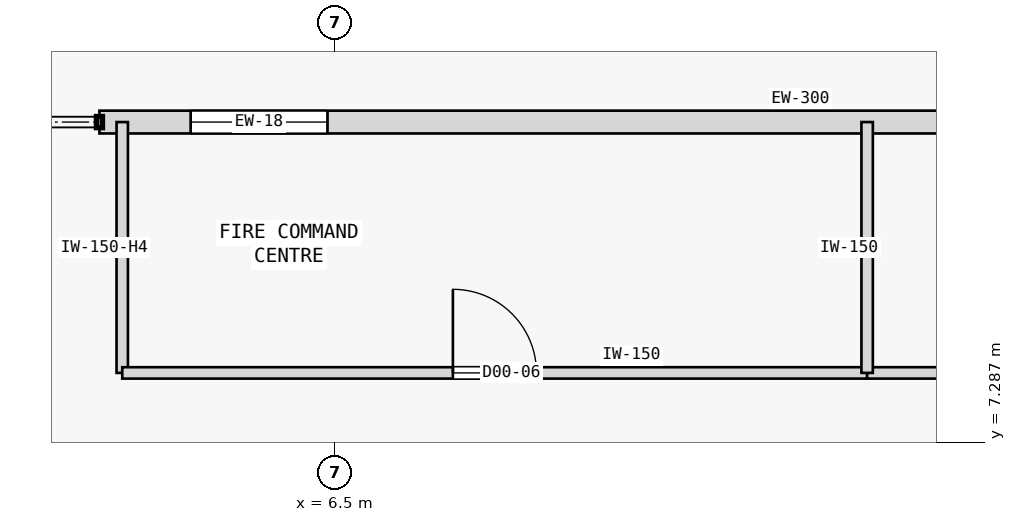
"""IFC4 building model, lengths in metres.
Left out: names, types, materials, properties, quantities, classifications, styles, units other than length and angle.
Written with IfcOpenShell. Run it as: python <this file> out.ifc"""

import sys

from ifc_helpers import new_model, si_unit, direction, frame, frame_2d, origin, place, context, subcontext, project, spatial, rectangle, extrude, element, fill, save


model = new_model("IFC4")
c1 = context("Model", 3, precision=1e-05, world=origin(), true_north=direction((0.0, 1.0)))
c2 = subcontext(c1, "Body", "Model", "MODEL_VIEW")
j1 = project(units=[si_unit("LENGTHUNIT", "METRE"), si_unit("PLANEANGLEUNIT", "RADIAN")], contexts=[c1])
p1 = place(None, origin())
s1 = spatial("IfcSite", under=j1, at=p1, CompositionType="ELEMENT")
p2 = place(p1, origin())
s2 = spatial("IfcBuilding", under=s1, at=p2, CompositionType="ELEMENT")
p3 = place(p2, origin())
s3 = spatial("IfcBuildingStorey", under=s2, at=p3, CompositionType="ELEMENT", Elevation=0.0)
p4 = place(p3, frame((3.4, 11.5, 0.0), z_axis=(0.0, 0.0, 1.0), x_axis=(1.0, 0.0, 0.0)))
e1 = element("IfcWall", 1, at=p4, inside=s3, PredefinedType="STANDARD", context=c2, shape_type="SweptSolid", body=[
    extrude(rectangle(XDim=18.45, YDim=0.3, at=frame_2d((9.225, 0.0))), origin(), (0.0, 0.0, 1.0), 9.195),
])
p5 = place(p4, frame((1.2, 0.0, 1.1)))
e2 = element("IfcOpeningElement", 2, at=p5, cuts=e1, PredefinedType="OPENING", context=c2, shape_type="SweptSolid", body=[
    extrude(rectangle(XDim=1.8, YDim=2.1, at=frame_2d((0.9, 1.05))), frame((0.0, 0.16, 0.0), z_axis=(0.0, -1.0, 0.0), x_axis=(1.0, 0.0, 0.0)), (0.0, 0.0, 1.0), 0.32),
])
p6 = place(p3, frame((3.7, 8.2, 0.0), z_axis=(0.0, 0.0, 1.0), x_axis=(0.0, 1.0, 0.0)))
e3 = element("IfcWall", 3, at=p6, inside=s3, PredefinedType="PARTITIONING", context=c2, shape_type="SweptSolid", body=[
    extrude(rectangle(XDim=3.3, YDim=0.15, at=frame_2d((1.65, 0.0))), origin(), (0.0, 0.0, 1.0), 8.14),
])
p7 = place(p3, frame((3.7, 8.2, 0.0), z_axis=(0.0, 0.0, 1.0), x_axis=(1.0, 0.0, 0.0)))
e4 = element("IfcWall", 4, at=p7, inside=s3, PredefinedType="PARTITIONING", context=c2, shape_type="SweptSolid", body=[
    extrude(rectangle(XDim=9.8, YDim=0.15, at=frame_2d((4.9, 0.0))), origin(), (0.0, 0.0, 1.0), 9.2),
])
p8 = place(p7, frame((4.35, 0.0, 0.0)))
e5 = element("IfcOpeningElement", 5, at=p8, cuts=e4, PredefinedType="OPENING", context=c2, shape_type="SweptSolid", body=[
    extrude(rectangle(XDim=1.1, YDim=2.15, at=frame_2d((0.55, 1.075))), frame((0.0, 0.085, 0.0), z_axis=(0.0, -1.0, 0.0), x_axis=(1.0, 0.0, 0.0)), (0.0, 0.0, 1.0), 0.17),
])
p9 = place(p3, frame((13.5, 8.2, 0.0), z_axis=(0.0, 0.0, 1.0), x_axis=(1.0, 0.0, 0.0)))
e6 = element("IfcWall", 6, at=p9, inside=s3, PredefinedType="PARTITIONING", context=c2, shape_type="SweptSolid", body=[
    extrude(rectangle(XDim=3.6, YDim=0.15, at=frame_2d((1.8, 0.0))), origin(), (0.0, 0.0, 1.0), 9.2),
])
p10 = place(p9, frame((1.325, 0.0, 0.0)))
e7 = element("IfcOpeningElement", 7, at=p10, cuts=e6, PredefinedType="OPENING", context=c2, shape_type="SweptSolid", body=[
    extrude(rectangle(XDim=0.95, YDim=2.15, at=frame_2d((0.475, 1.075))), frame((0.0, 0.085, 0.0), z_axis=(0.0, -1.0, 0.0), x_axis=(1.0, 0.0, 0.0)), (0.0, 0.0, 1.0), 0.17),
])
p11 = place(p3, frame((13.5, 8.2, 0.0), z_axis=(0.0, 0.0, 1.0), x_axis=(0.0, 1.0, 0.0)))
e8 = element("IfcWall", 8, at=p11, inside=s3, PredefinedType="PARTITIONING", context=c2, shape_type="SweptSolid", body=[
    extrude(rectangle(XDim=3.3, YDim=0.15, at=frame_2d((1.65, 0.0))), origin(), (0.0, 0.0, 1.0), 9.2),
])
p12 = place(p5, origin())
e9 = element("IfcWindow", 9, at=p12, inside=s3, PartitioningType="SINGLE_PANEL", PredefinedType="WINDOW", context=c2, shape_type="SweptSolid", body=[
    extrude(rectangle(XDim=1.8, YDim=2.1, at=frame_2d((0.9, 1.05))), frame((0.0, 0.03, 0.0), z_axis=(0.0, -1.0, 0.0), x_axis=(1.0, 0.0, 0.0)), (0.0, 0.0, 1.0), 0.06),
])
fill(e2, e9)
p13 = place(p8, origin())
e10 = element("IfcDoor", 10, at=p13, inside=s3, OperationType="SINGLE_SWING_LEFT", PredefinedType="DOOR", context=c2, shape_type="SweptSolid", body=[
    extrude(rectangle(XDim=1.1, YDim=2.15, at=frame_2d((0.55, 1.075))), frame((0.0, 0.025, 0.0), z_axis=(0.0, -1.0, 0.0), x_axis=(1.0, 0.0, 0.0)), (0.0, 0.0, 1.0), 0.05),
])
fill(e5, e10)
save(model, sys.argv[1])
